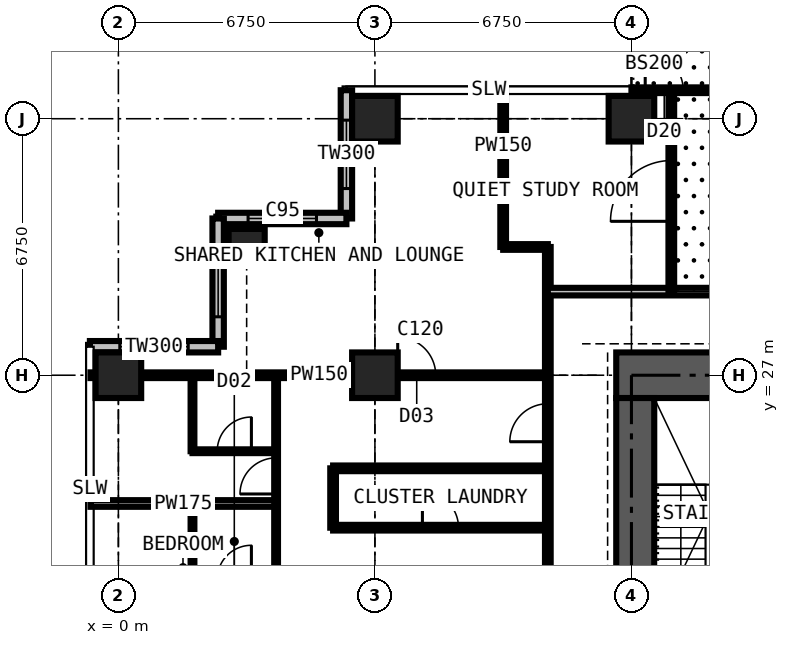
"""IFC4 building model, lengths in metres.
Left out: names, types, materials, properties, quantities, classifications, styles, units other than length and angle.
Written with IfcOpenShell. Run it as: python <this file> out.ifc"""

import sys

from ifc_helpers import new_model, si_unit, direction, frame, frame_2d, origin, origin_2d, place, context, subcontext, project, spatial, rectangle, extrude, element, fill, save


model = new_model("IFC4")
c1 = context("Model", 3, precision=1e-05, world=origin(), true_north=direction((0.0, 1.0)))
c2 = subcontext(c1, "Body", "Model", "MODEL_VIEW")
j1 = project(units=[si_unit("LENGTHUNIT", "METRE"), si_unit("PLANEANGLEUNIT", "RADIAN")], contexts=[c1])
p1 = place(None, origin())
s1 = spatial("IfcSite", under=j1, at=p1, CompositionType="ELEMENT")
p2 = place(p1, origin())
s2 = spatial("IfcBuilding", under=s1, at=p2, CompositionType="ELEMENT")
p3 = place(p2, frame((0.0, 0.0, 171.0)))
s3 = spatial("IfcBuildingStorey", under=s2, at=p3, CompositionType="ELEMENT", Elevation=171.0)
p4 = place(p3, frame((0.0, 27.0, 0.0), z_axis=(0.0, 0.0, 1.0), x_axis=(1.0, 0.0, 0.0)))
e1 = element("IfcColumn", 1, at=p4, inside=s3, PredefinedType="COLUMN", context=c2, shape_type="SweptSolid", body=[
    extrude(rectangle(XDim=1.2, YDim=1.2, at=origin_2d()), origin(), (0.0, 0.0, 1.0), 3.6),
])
p5 = place(p3, frame((3.375, 30.375, 0.0), z_axis=(0.0, 0.0, 1.0), x_axis=(1.0, 0.0, 0.0)))
e2 = element("IfcColumn", 2, at=p5, inside=s3, PredefinedType="COLUMN", context=c2, shape_type="SweptSolid", body=[
    extrude(rectangle(XDim=0.95, YDim=0.95, at=origin_2d()), origin(), (0.0, 0.0, 1.0), 3.6),
])
for number, where, z_axis, x_axis in (
    (3, (6.75, 27.0, 0.0), (0.0, 0.0, 1.0), (1.0, 0.0, 0.0)),
    (4, (6.75, 33.75, 0.0), (0.0, 0.0, 1.0), (1.0, 0.0, 0.0)),
    (5, (13.5, 33.75, 0.0), (0.0, 0.0, 1.0), (1.0, 0.0, 0.0)),
):
    element("IfcColumn", number, at=place(p3, frame(where, z_axis=z_axis, x_axis=x_axis)), inside=s3, PredefinedType="COLUMN", context=c2, shape_type="SweptSolid", body=[
        extrude(rectangle(XDim=1.2, YDim=1.2, at=origin_2d()), origin(), (0.0, 0.0, 1.0), 3.6),
    ])
p6 = place(p3, frame((27.4, 27.0, 0.0), z_axis=(0.0, 0.0, 1.0), x_axis=(-1.0, 0.0, 0.0)))
e6 = element("IfcWall", 6, at=p6, inside=s3, PredefinedType="SHEAR", context=c2, shape_type="SweptSolid", body=[
    extrude(rectangle(XDim=14.3, YDim=1.2, at=frame_2d((7.15, 0.0))), origin(), (0.0, 0.0, 1.0), 3.6),
])
p7 = place(p6, frame((4.55, 0.0, 0.0)))
e7 = element("IfcOpeningElement", 7, at=p7, cuts=e6, PredefinedType="OPENING", context=c2, shape_type="SweptSolid", body=[
    extrude(rectangle(XDim=0.9, YDim=2.2, at=frame_2d((0.45, 1.1))), frame((0.0, 0.61, 0.0), z_axis=(0.0, -1.0, 0.0), x_axis=(1.0, 0.0, 0.0)), (0.0, 0.0, 1.0), 1.22),
])
p8 = place(p6, frame((7.525, 0.0, 0.0)))
e8 = element("IfcOpeningElement", 8, at=p8, cuts=e6, PredefinedType="OPENING", context=c2, shape_type="SweptSolid", body=[
    extrude(rectangle(XDim=1.0, YDim=2.2, at=frame_2d((0.5, 1.1))), frame((0.0, 0.61, 0.0), z_axis=(0.0, -1.0, 0.0), x_axis=(1.0, 0.0, 0.0)), (0.0, 0.0, 1.0), 1.22),
])
p9 = place(p3, frame((13.6, 26.4, 0.0), z_axis=(0.0, 0.0, 1.0), x_axis=(0.0, -1.0, 0.0)))
e9 = element("IfcWall", 9, at=p9, inside=s3, PredefinedType="SHEAR", context=c2, shape_type="SweptSolid", body=[
    extrude(rectangle(XDim=12.3, YDim=1.0, at=frame_2d((6.15, 0.0))), origin(), (0.0, 0.0, 1.0), 3.6),
])
p10 = place(p9, frame((7.45, 0.0, 0.0)))
e10 = element("IfcOpeningElement", 10, at=p10, cuts=e9, PredefinedType="OPENING", context=c2, shape_type="SweptSolid", body=[
    extrude(rectangle(XDim=1.2, YDim=2.2, at=frame_2d((0.6, 1.1))), frame((0.0, 0.51, 0.0), z_axis=(0.0, -1.0, 0.0), x_axis=(1.0, 0.0, 0.0)), (0.0, 0.0, 1.0), 1.02),
])
p11 = place(p3, frame((13.5, 34.5, 0.0), z_axis=(0.0, 0.0, 1.0), x_axis=(1.0, 0.0, 0.0)))
e11 = element("IfcWall", 11, at=p11, inside=s3, PredefinedType="SOLIDWALL", context=c2, shape_type="SweptSolid", body=[
    extrude(rectangle(XDim=6.75, YDim=0.15, at=frame_2d((3.375, 0.0))), origin(), (0.0, 0.0, 1.0), 3.375),
])
p12 = place(p11, frame((0.363, 0.0, 0.0)))
e12 = element("IfcOpeningElement", 12, at=p12, cuts=e11, PredefinedType="OPENING", context=c2, shape_type="SweptSolid", body=[
    extrude(rectangle(XDim=1.0, YDim=2.2, at=frame_2d((0.5, 1.1))), frame((0.0, 0.085, 0.0), z_axis=(0.0, -1.0, 0.0), x_axis=(1.0, 0.0, 0.0)), (0.0, 0.0, 1.0), 0.17),
])
p13 = place(p11, frame((1.725, 0.0, 0.9)))
e13 = element("IfcOpeningElement", 13, at=p13, cuts=e11, PredefinedType="OPENING", context=c2, shape_type="SweptSolid", body=[
    extrude(rectangle(XDim=1.2, YDim=1.8, at=frame_2d((0.6, 0.9))), frame((0.0, 0.085, 0.0), z_axis=(0.0, -1.0, 0.0), x_axis=(1.0, 0.0, 0.0)), (0.0, 0.0, 1.0), 0.17),
])
p14 = place(p11, frame((5.137, 0.0, 0.0)))
e14 = element("IfcOpeningElement", 14, at=p14, cuts=e11, PredefinedType="OPENING", context=c2, shape_type="SweptSolid", body=[
    extrude(rectangle(XDim=1.0, YDim=2.2, at=frame_2d((0.5, 1.1))), frame((0.0, 0.085, 0.0), z_axis=(0.0, -1.0, 0.0), x_axis=(1.0, 0.0, 0.0)), (0.0, 0.0, 1.0), 0.17),
])
p15 = place(p11, frame((3.825, 0.0, 0.9)))
e15 = element("IfcOpeningElement", 15, at=p15, cuts=e11, PredefinedType="OPENING", context=c2, shape_type="SweptSolid", body=[
    extrude(rectangle(XDim=1.2, YDim=1.8, at=frame_2d((0.6, 0.9))), frame((0.0, 0.085, 0.0), z_axis=(0.0, -1.0, 0.0), x_axis=(1.0, 0.0, 0.0)), (0.0, 0.0, 1.0), 0.17),
])
p16 = place(p3, frame((6.0, 34.5, 0.0), z_axis=(0.0, 0.0, 1.0), x_axis=(0.0, -1.0, 0.0)))
e16 = element("IfcWall", 16, at=p16, inside=s3, PredefinedType="SOLIDWALL", context=c2, shape_type="SweptSolid", body=[
    extrude(rectangle(XDim=3.375, YDim=0.3, at=frame_2d((1.688, 0.0))), origin(), (0.0, 0.0, 1.0), 3.375),
])
p17 = place(p16, frame((0.788, 0.0, 0.6)))
e17 = element("IfcOpeningElement", 17, at=p17, cuts=e16, PredefinedType="OPENING", context=c2, shape_type="SweptSolid", body=[
    extrude(rectangle(XDim=1.8, YDim=2.1, at=frame_2d((0.9, 1.05))), frame((0.0, 0.16, 0.0), z_axis=(0.0, -1.0, 0.0), x_axis=(1.0, 0.0, 0.0)), (0.0, 0.0, 1.0), 0.32),
])
p18 = place(p3, frame((6.0, 31.125, 0.0), z_axis=(0.0, 0.0, 1.0), x_axis=(-1.0, 0.0, 0.0)))
e18 = element("IfcWall", 18, at=p18, inside=s3, PredefinedType="SOLIDWALL", context=c2, shape_type="SweptSolid", body=[
    extrude(rectangle(XDim=3.375, YDim=0.3, at=frame_2d((1.688, 0.0))), origin(), (0.0, 0.0, 1.0), 3.375),
])
p19 = place(p18, frame((0.788, 0.0, 0.6)))
e19 = element("IfcOpeningElement", 19, at=p19, cuts=e18, PredefinedType="OPENING", context=c2, shape_type="SweptSolid", body=[
    extrude(rectangle(XDim=1.8, YDim=2.1, at=frame_2d((0.9, 1.05))), frame((0.0, 0.16, 0.0), z_axis=(0.0, -1.0, 0.0), x_axis=(1.0, 0.0, 0.0)), (0.0, 0.0, 1.0), 0.32),
])
p20 = place(p3, frame((2.625, 31.125, 0.0), z_axis=(0.0, 0.0, 1.0), x_axis=(0.0, -1.0, 0.0)))
e20 = element("IfcWall", 20, at=p20, inside=s3, PredefinedType="SOLIDWALL", context=c2, shape_type="SweptSolid", body=[
    extrude(rectangle(XDim=3.375, YDim=0.3, at=frame_2d((1.688, 0.0))), origin(), (0.0, 0.0, 1.0), 3.375),
])
p21 = place(p20, frame((0.788, 0.0, 0.6)))
e21 = element("IfcOpeningElement", 21, at=p21, cuts=e20, PredefinedType="OPENING", context=c2, shape_type="SweptSolid", body=[
    extrude(rectangle(XDim=1.8, YDim=2.1, at=frame_2d((0.9, 1.05))), frame((0.0, 0.16, 0.0), z_axis=(0.0, -1.0, 0.0), x_axis=(1.0, 0.0, 0.0)), (0.0, 0.0, 1.0), 0.32),
])
p22 = place(p3, frame((2.625, 27.75, 0.0), z_axis=(0.0, 0.0, 1.0), x_axis=(-1.0, 0.0, 0.0)))
e22 = element("IfcWall", 22, at=p22, inside=s3, PredefinedType="SOLIDWALL", context=c2, shape_type="SweptSolid", body=[
    extrude(rectangle(XDim=3.375, YDim=0.3, at=frame_2d((1.688, 0.0))), origin(), (0.0, 0.0, 1.0), 3.375),
])
p23 = place(p22, frame((0.788, 0.0, 0.6)))
e23 = element("IfcOpeningElement", 23, at=p23, cuts=e22, PredefinedType="OPENING", context=c2, shape_type="SweptSolid", body=[
    extrude(rectangle(XDim=1.8, YDim=2.1, at=frame_2d((0.9, 1.05))), frame((0.0, 0.16, 0.0), z_axis=(0.0, -1.0, 0.0), x_axis=(1.0, 0.0, 0.0)), (0.0, 0.0, 1.0), 0.32),
])
p24 = place(p3, frame((-0.734, 23.625, 0.0), z_axis=(0.0, 0.0, 1.0), x_axis=(1.0, 0.0, 0.0)))
e24 = element("IfcWall", 24, at=p24, inside=s3, PredefinedType="PARTITIONING", context=c2, shape_type="SweptSolid", body=[
    extrude(rectangle(XDim=4.884, YDim=0.175, at=frame_2d((2.442, 0.0))), origin(), (0.0, 0.0, 1.0), 3.375),
])
p25 = place(p3, frame((-0.734, 27.0, 0.0), z_axis=(0.0, 0.0, 1.0), x_axis=(1.0, 0.0, 0.0)))
e25 = element("IfcWall", 25, at=p25, inside=s3, PredefinedType="PARTITIONING", context=c2, shape_type="SweptSolid", body=[
    extrude(rectangle(XDim=12.034, YDim=0.15, at=frame_2d((6.017, 0.0))), origin(), (0.0, 0.0, 1.0), 2.806),
])
p26 = place(p25, frame((8.084, 0.0, 0.0)))
e26 = element("IfcOpeningElement", 26, at=p26, cuts=e25, PredefinedType="OPENING", context=c2, shape_type="SweptSolid", body=[
    extrude(rectangle(XDim=1.0, YDim=2.2, at=frame_2d((0.5, 1.1))), frame((0.0, 0.085, 0.0), z_axis=(0.0, -1.0, 0.0), x_axis=(1.0, 0.0, 0.0)), (0.0, 0.0, 1.0), 0.17),
])
for number, where, z_axis, x_axis in (
    (27, (1.95, 21.625, 0.0), (0.0, 0.0, 1.0), (0.0, 1.0, 0.0)),
    (28, (1.95, 25.0, 0.0), (0.0, 0.0, 1.0), (0.0, 1.0, 0.0)),
):
    element("IfcWall", number, at=place(p3, frame(where, z_axis=z_axis, x_axis=x_axis)), inside=s3, PredefinedType="PARTITIONING", context=c2, shape_type="SweptSolid", body=[
        extrude(rectangle(XDim=2.0, YDim=0.1, at=frame_2d((1.0, 0.0))), origin(), (0.0, 0.0, 1.0), 3.375),
    ])
p27 = place(p3, frame((1.95, 25.0, 0.0), z_axis=(0.0, 0.0, 1.0), x_axis=(1.0, 0.0, 0.0)))
e29 = element("IfcWall", 29, at=p27, inside=s3, PredefinedType="PARTITIONING", context=c2, shape_type="SweptSolid", body=[
    extrude(rectangle(XDim=2.2, YDim=0.1, at=frame_2d((1.1, 0.0))), origin(), (0.0, 0.0, 1.0), 3.375),
])
p28 = place(p27, frame((0.65, 0.0, 0.0)))
e30 = element("IfcOpeningElement", 30, at=p28, cuts=e29, PredefinedType="OPENING", context=c2, shape_type="SweptSolid", body=[
    extrude(rectangle(XDim=0.9, YDim=2.2, at=frame_2d((0.45, 1.1))), frame((0.0, 0.06, 0.0), z_axis=(0.0, -1.0, 0.0), x_axis=(1.0, 0.0, 0.0)), (0.0, 0.0, 1.0), 0.12),
])
p29 = place(p3, frame((4.15, 10.125, 0.0), z_axis=(0.0, 0.0, 1.0), x_axis=(0.0, 1.0, 0.0)))
e31 = element("IfcWall", 31, at=p29, inside=s3, PredefinedType="PARTITIONING", context=c2, shape_type="SweptSolid", body=[
    extrude(rectangle(XDim=16.875, YDim=0.1, at=frame_2d((8.438, 0.0))), origin(), (0.0, 0.0, 1.0), 3.375),
])
p30 = place(p29, frame((0.2, 0.0, 0.0)))
e32 = element("IfcOpeningElement", 32, at=p30, cuts=e31, PredefinedType="OPENING", context=c2, shape_type="SweptSolid", body=[
    extrude(rectangle(XDim=0.95, YDim=2.2, at=frame_2d((0.475, 1.1))), frame((0.0, 0.06, 0.0), z_axis=(0.0, -1.0, 0.0), x_axis=(1.0, 0.0, 0.0)), (0.0, 0.0, 1.0), 0.12),
])
p31 = place(p29, frame((3.625, 0.0, 0.0)))
e33 = element("IfcOpeningElement", 33, at=p31, cuts=e31, PredefinedType="OPENING", context=c2, shape_type="SweptSolid", body=[
    extrude(rectangle(XDim=0.95, YDim=2.2, at=frame_2d((0.475, 1.1))), frame((0.0, 0.06, 0.0), z_axis=(0.0, -1.0, 0.0), x_axis=(1.0, 0.0, 0.0)), (0.0, 0.0, 1.0), 0.12),
])
p32 = place(p29, frame((7.0, 0.0, 0.0)))
e34 = element("IfcOpeningElement", 34, at=p32, cuts=e31, PredefinedType="OPENING", context=c2, shape_type="SweptSolid", body=[
    extrude(rectangle(XDim=0.95, YDim=2.2, at=frame_2d((0.475, 1.1))), frame((0.0, 0.06, 0.0), z_axis=(0.0, -1.0, 0.0), x_axis=(1.0, 0.0, 0.0)), (0.0, 0.0, 1.0), 0.12),
])
p33 = place(p29, frame((10.375, 0.0, 0.0)))
e35 = element("IfcOpeningElement", 35, at=p33, cuts=e31, PredefinedType="OPENING", context=c2, shape_type="SweptSolid", body=[
    extrude(rectangle(XDim=0.95, YDim=2.2, at=frame_2d((0.475, 1.1))), frame((0.0, 0.06, 0.0), z_axis=(0.0, -1.0, 0.0), x_axis=(1.0, 0.0, 0.0)), (0.0, 0.0, 1.0), 0.12),
])
p34 = place(p29, frame((13.75, 0.0, 0.0)))
e36 = element("IfcOpeningElement", 36, at=p34, cuts=e31, PredefinedType="OPENING", context=c2, shape_type="SweptSolid", body=[
    extrude(rectangle(XDim=0.95, YDim=2.2, at=frame_2d((0.475, 1.1))), frame((0.0, 0.06, 0.0), z_axis=(0.0, -1.0, 0.0), x_axis=(1.0, 0.0, 0.0)), (0.0, 0.0, 1.0), 0.12),
])
p35 = place(p3, frame((5.65, 22.988, 0.0), z_axis=(0.0, 0.0, 1.0), x_axis=(0.0, 1.0, 0.0)))
e37 = element("IfcWall", 37, at=p35, inside=s3, PredefinedType="PARTITIONING", context=c2, shape_type="SweptSolid", body=[
    extrude(rectangle(XDim=1.562, YDim=0.15, at=frame_2d((0.781, 0.0))), origin(), (0.0, 0.0, 1.0), 3.375),
])
p36 = place(p3, frame((5.65, 22.988, 0.0), z_axis=(0.0, 0.0, 1.0), x_axis=(1.0, 0.0, 0.0)))
e38 = element("IfcWall", 38, at=p36, inside=s3, PredefinedType="PARTITIONING", context=c2, shape_type="SweptSolid", body=[
    extrude(rectangle(XDim=5.65, YDim=0.15, at=frame_2d((2.825, 0.0))), origin(), (0.0, 0.0, 1.0), 3.375),
])
p37 = place(p36, frame((2.35, 0.0, 0.0)))
e39 = element("IfcOpeningElement", 39, at=p37, cuts=e38, PredefinedType="OPENING", context=c2, shape_type="SweptSolid", body=[
    extrude(rectangle(XDim=0.95, YDim=2.2, at=frame_2d((0.475, 1.1))), frame((0.0, 0.085, 0.0), z_axis=(0.0, -1.0, 0.0), x_axis=(1.0, 0.0, 0.0)), (0.0, 0.0, 1.0), 0.17),
])
p38 = place(p3, frame((5.65, 24.55, 0.0), z_axis=(0.0, 0.0, 1.0), x_axis=(1.0, 0.0, 0.0)))
e40 = element("IfcWall", 40, at=p38, inside=s3, PredefinedType="PARTITIONING", context=c2, shape_type="SweptSolid", body=[
    extrude(rectangle(XDim=5.65, YDim=0.15, at=frame_2d((2.825, 0.0))), origin(), (0.0, 0.0, 1.0), 3.375),
])
p39 = place(p3, frame((10.125, 30.375, 0.0), z_axis=(0.0, 0.0, 1.0), x_axis=(0.0, 1.0, 0.0)))
e41 = element("IfcWall", 41, at=p39, inside=s3, PredefinedType="PARTITIONING", context=c2, shape_type="SweptSolid", body=[
    extrude(rectangle(XDim=4.109, YDim=0.15, at=frame_2d((2.054, 0.0))), origin(), (0.0, 0.0, 1.0), 3.375),
])
p40 = place(p3, frame((10.125, 30.375, 0.0), z_axis=(0.0, 0.0, 1.0), x_axis=(1.0, 0.0, 0.0)))
e42 = element("IfcWall", 42, at=p40, inside=s3, PredefinedType="PARTITIONING", context=c2, shape_type="SweptSolid", body=[
    extrude(rectangle(XDim=1.175, YDim=0.15, at=frame_2d((0.587, 0.0))), origin(), (0.0, 0.0, 1.0), 3.375),
])
p41 = place(p3, frame((11.3, 11.3, 0.0), z_axis=(0.0, 0.0, 1.0), x_axis=(0.0, 1.0, 0.0)))
e43 = element("IfcWall", 43, at=p41, inside=s3, PredefinedType="PARTITIONING", context=c2, shape_type="SweptSolid", body=[
    extrude(rectangle(XDim=19.075, YDim=0.15, at=frame_2d((9.538, 0.0))), origin(), (0.0, 0.0, 1.0), 3.375),
])
p42 = place(p41, frame((13.95, 0.0, 0.0)))
e44 = element("IfcOpeningElement", 44, at=p42, cuts=e43, PredefinedType="OPENING", context=c2, shape_type="SweptSolid", body=[
    extrude(rectangle(XDim=1.0, YDim=2.2, at=frame_2d((0.5, 1.1))), frame((0.0, 0.085, 0.0), z_axis=(0.0, -1.0, 0.0), x_axis=(1.0, 0.0, 0.0)), (0.0, 0.0, 1.0), 0.17),
])
p43 = place(p3, frame((11.3, 29.2, 0.0), z_axis=(0.0, 0.0, 1.0), x_axis=(1.0, 0.0, 0.0)))
e45 = element("IfcWall", 45, at=p43, inside=s3, PredefinedType="PARTITIONING", context=c2, shape_type="SweptSolid", body=[
    extrude(rectangle(XDim=17.9, YDim=0.2, at=frame_2d((8.95, 0.0))), origin(), (0.0, 0.0, 1.0), 3.375),
])
p44 = place(p43, frame((14.25, 0.0, 0.0)))
e46 = element("IfcOpeningElement", 46, at=p44, cuts=e45, PredefinedType="OPENING", context=c2, shape_type="SweptSolid", body=[
    extrude(rectangle(XDim=1.0, YDim=2.2, at=frame_2d((0.5, 1.1))), frame((0.0, 0.11, 0.0), z_axis=(0.0, -1.0, 0.0), x_axis=(1.0, 0.0, 0.0)), (0.0, 0.0, 1.0), 0.22),
])
p45 = place(p43, frame((16.35, 0.0, 0.0)))
e47 = element("IfcOpeningElement", 47, at=p45, cuts=e45, PredefinedType="OPENING", context=c2, shape_type="SweptSolid", body=[
    extrude(rectangle(XDim=1.0, YDim=2.2, at=frame_2d((0.5, 1.1))), frame((0.0, 0.11, 0.0), z_axis=(0.0, -1.0, 0.0), x_axis=(1.0, 0.0, 0.0)), (0.0, 0.0, 1.0), 0.22),
])
p46 = place(p43, frame((7.749, 0.0, 0.0)))
e48 = element("IfcOpeningElement", 48, at=p46, cuts=e45, PredefinedType="OPENING", context=c2, shape_type="SweptSolid", body=[
    extrude(rectangle(XDim=1.5, YDim=2.2, at=frame_2d((0.75, 1.1))), frame((0.0, 0.11, 0.0), z_axis=(0.0, -1.0, 0.0), x_axis=(1.0, 0.0, 0.0)), (0.0, 0.0, 1.0), 0.22),
])
p47 = place(p3, frame((14.549, 29.2, 0.0), z_axis=(0.0, 0.0, 1.0), x_axis=(0.0, 1.0, 0.0)))
e49 = element("IfcWall", 49, at=p47, inside=s3, PredefinedType="PARTITIONING", context=c2, shape_type="SweptSolid", body=[
    extrude(rectangle(XDim=5.225, YDim=0.15, at=frame_2d((2.613, 0.0))), origin(), (0.0, 0.0, 1.0), 3.375),
])
p48 = place(p47, frame((1.85, 0.0, 0.0)))
e50 = element("IfcOpeningElement", 50, at=p48, cuts=e49, PredefinedType="OPENING", context=c2, shape_type="SweptSolid", body=[
    extrude(rectangle(XDim=1.6, YDim=2.4, at=frame_2d((0.8, 1.2))), frame((0.0, 0.085, 0.0), z_axis=(0.0, -1.0, 0.0), x_axis=(1.0, 0.0, 0.0)), (0.0, 0.0, 1.0), 0.17),
])
p49 = place(p12, origin())
e51 = element("IfcDoor", 51, at=p49, inside=s3, OperationType="SINGLE_SWING_LEFT", PredefinedType="DOOR", context=c2, shape_type="SweptSolid", body=[
    extrude(rectangle(XDim=1.0, YDim=2.2, at=frame_2d((0.5, 1.1))), frame((0.0, 0.025, 0.0), z_axis=(0.0, -1.0, 0.0), x_axis=(1.0, 0.0, 0.0)), (0.0, 0.0, 1.0), 0.05),
])
fill(e12, e51)
p50 = place(p13, origin())
e52 = element("IfcWindow", 52, at=p50, inside=s3, PartitioningType="SINGLE_PANEL", PredefinedType="WINDOW", context=c2, shape_type="SweptSolid", body=[
    extrude(rectangle(XDim=1.2, YDim=1.8, at=frame_2d((0.6, 0.9))), frame((0.0, 0.03, 0.0), z_axis=(0.0, -1.0, 0.0), x_axis=(1.0, 0.0, 0.0)), (0.0, 0.0, 1.0), 0.06),
])
fill(e13, e52)
p51 = place(p17, origin())
e53 = element("IfcWindow", 53, at=p51, inside=s3, PartitioningType="SINGLE_PANEL", PredefinedType="WINDOW", context=c2, shape_type="SweptSolid", body=[
    extrude(rectangle(XDim=1.8, YDim=2.1, at=frame_2d((0.9, 1.05))), frame((0.0, 0.03, 0.0), z_axis=(0.0, -1.0, 0.0), x_axis=(1.0, 0.0, 0.0)), (0.0, 0.0, 1.0), 0.06),
])
fill(e17, e53)
p52 = place(p19, origin())
e54 = element("IfcWindow", 54, at=p52, inside=s3, PartitioningType="SINGLE_PANEL", PredefinedType="WINDOW", context=c2, shape_type="SweptSolid", body=[
    extrude(rectangle(XDim=1.8, YDim=2.1, at=frame_2d((0.9, 1.05))), frame((0.0, 0.03, 0.0), z_axis=(0.0, -1.0, 0.0), x_axis=(1.0, 0.0, 0.0)), (0.0, 0.0, 1.0), 0.06),
])
fill(e19, e54)
p53 = place(p21, origin())
e55 = element("IfcWindow", 55, at=p53, inside=s3, PartitioningType="SINGLE_PANEL", PredefinedType="WINDOW", context=c2, shape_type="SweptSolid", body=[
    extrude(rectangle(XDim=1.8, YDim=2.1, at=frame_2d((0.9, 1.05))), frame((0.0, 0.03, 0.0), z_axis=(0.0, -1.0, 0.0), x_axis=(1.0, 0.0, 0.0)), (0.0, 0.0, 1.0), 0.06),
])
fill(e21, e55)
p54 = place(p23, origin())
e56 = element("IfcWindow", 56, at=p54, inside=s3, PartitioningType="SINGLE_PANEL", PredefinedType="WINDOW", context=c2, shape_type="SweptSolid", body=[
    extrude(rectangle(XDim=1.8, YDim=2.1, at=frame_2d((0.9, 1.05))), frame((0.0, 0.03, 0.0), z_axis=(0.0, -1.0, 0.0), x_axis=(1.0, 0.0, 0.0)), (0.0, 0.0, 1.0), 0.06),
])
fill(e23, e56)
p55 = place(p48, origin())
e57 = element("IfcDoor", 57, at=p55, inside=s3, OperationType="DOUBLE_DOOR_SINGLE_SWING", PredefinedType="DOOR", context=c2, shape_type="SweptSolid", body=[
    extrude(rectangle(XDim=1.6, YDim=2.4, at=frame_2d((0.8, 1.2))), frame((0.0, 0.025, 0.0), z_axis=(0.0, -1.0, 0.0), x_axis=(1.0, 0.0, 0.0)), (0.0, 0.0, 1.0), 0.05),
])
fill(e50, e57)
p56 = place(p34, origin())
e58 = element("IfcDoor", 58, at=p56, inside=s3, OperationType="SINGLE_SWING_LEFT", PredefinedType="DOOR", context=c2, shape_type="SweptSolid", body=[
    extrude(rectangle(XDim=0.95, YDim=2.2, at=frame_2d((0.475, 1.1))), frame((0.0, 0.025, 0.0), z_axis=(0.0, -1.0, 0.0), x_axis=(1.0, 0.0, 0.0)), (0.0, 0.0, 1.0), 0.05),
])
fill(e36, e58)
p57 = place(p28, origin())
e59 = element("IfcDoor", 59, at=p57, inside=s3, OperationType="SINGLE_SWING_RIGHT", PredefinedType="DOOR", context=c2, shape_type="SweptSolid", body=[
    extrude(rectangle(XDim=0.9, YDim=2.2, at=frame_2d((0.45, 1.1))), frame((0.0, 0.025, 0.0), z_axis=(0.0, -1.0, 0.0), x_axis=(1.0, 0.0, 0.0)), (0.0, 0.0, 1.0), 0.05),
])
fill(e30, e59)
p58 = place(p26, origin())
e60 = element("IfcDoor", 60, at=p58, inside=s3, OperationType="SINGLE_SWING_LEFT", PredefinedType="DOOR", context=c2, shape_type="SweptSolid", body=[
    extrude(rectangle(XDim=1.0, YDim=2.2, at=frame_2d((0.5, 1.1))), frame((0.0, 0.025, 0.0), z_axis=(0.0, -1.0, 0.0), x_axis=(1.0, 0.0, 0.0)), (0.0, 0.0, 1.0), 0.05),
])
fill(e26, e60)
p59 = place(p42, origin())
e61 = element("IfcDoor", 61, at=p59, inside=s3, OperationType="SINGLE_SWING_LEFT", PredefinedType="DOOR", context=c2, shape_type="SweptSolid", body=[
    extrude(rectangle(XDim=1.0, YDim=2.2, at=frame_2d((0.5, 1.1))), frame((0.0, 0.025, 0.0), z_axis=(0.0, -1.0, 0.0), x_axis=(1.0, 0.0, 0.0)), (0.0, 0.0, 1.0), 0.05),
])
fill(e44, e61)
p60 = place(p37, origin())
e62 = element("IfcDoor", 62, at=p60, inside=s3, OperationType="SINGLE_SWING_LEFT", PredefinedType="DOOR", context=c2, shape_type="SweptSolid", body=[
    extrude(rectangle(XDim=0.95, YDim=2.2, at=frame_2d((0.475, 1.1))), frame((0.0, 0.025, 0.0), z_axis=(0.0, -1.0, 0.0), x_axis=(1.0, 0.0, 0.0)), (0.0, 0.0, 1.0), 0.05),
])
fill(e39, e62)
save(model, sys.argv[1])
